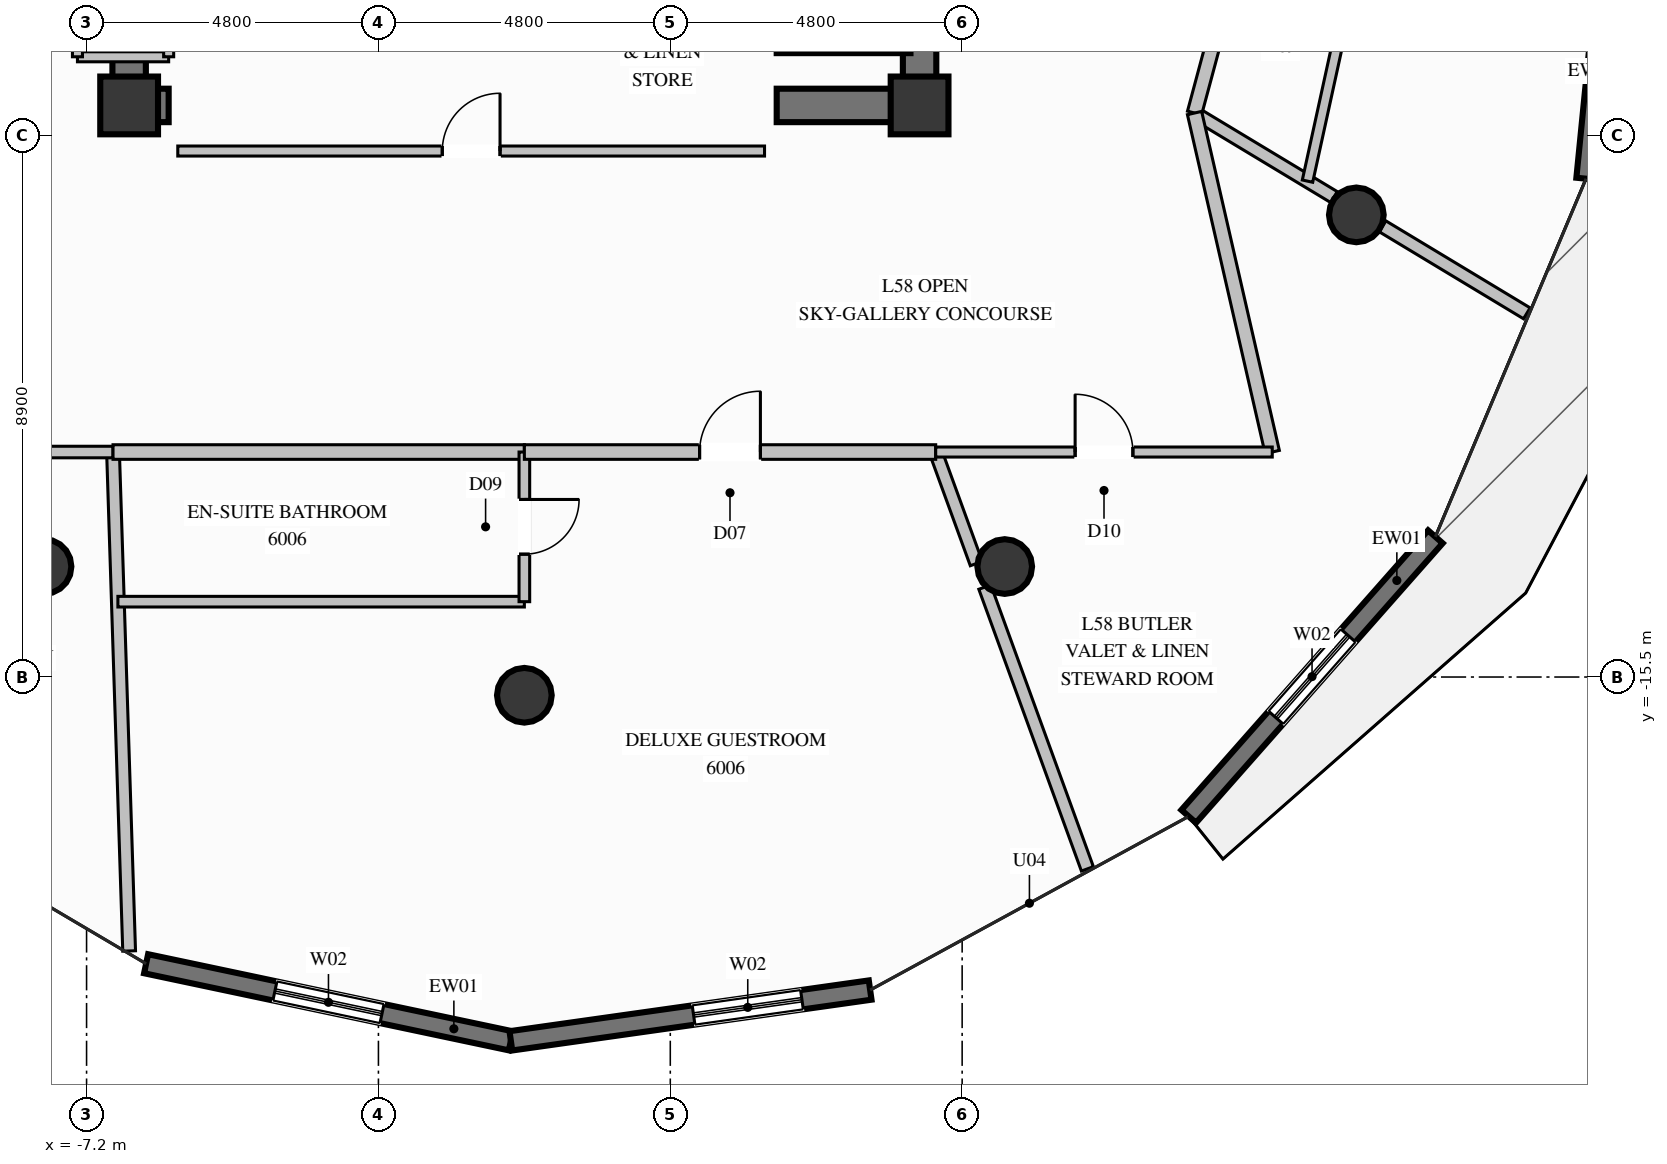
"""IFC4 building model, lengths in metres.
Left out: names, types, materials, properties, quantities, classifications, styles, units other than length and angle.
Written with IfcOpenShell. Run it as: python <this file> out.ifc"""

import sys

from ifc_helpers import new_model, si_unit, direction, frame, frame_2d, origin, origin_2d, place, context, subcontext, project, spatial, rectangle, circle, extrude, element, fill, save


model = new_model("IFC4")
c1 = context("Model", 3, precision=1e-05, world=origin(), true_north=direction((0.0, 1.0)))
c2 = subcontext(c1, "Body", "Model", "MODEL_VIEW")
j1 = project(units=[si_unit("LENGTHUNIT", "METRE"), si_unit("PLANEANGLEUNIT", "RADIAN")], contexts=[c1])
p1 = place(None, origin())
s1 = spatial("IfcSite", under=j1, at=p1, CompositionType="ELEMENT")
p2 = place(p1, origin())
s2 = spatial("IfcBuilding", under=s1, at=p2, CompositionType="ELEMENT")
p3 = place(p2, frame((0.0, 0.0, 223.6)))
s3 = spatial("IfcBuildingStorey", under=s2, at=p3, CompositionType="ELEMENT", Elevation=223.6)
for number, where, z_axis, x_axis in (
    (1, (-6.5, -6.1, 0.0), (0.0, 0.0, 1.0), (1.0, 0.0, 0.0)),
    (2, (6.5, -6.1, 0.0), (0.0, 0.0, 1.0), (1.0, 0.0, 0.0)),
):
    element("IfcColumn", number, at=place(p3, frame(where, z_axis=z_axis, x_axis=x_axis)), inside=s3, PredefinedType="COLUMN", context=c2, shape_type="SweptSolid", body=[
        extrude(rectangle(XDim=0.95, YDim=0.95, at=origin_2d()), origin(), (0.0, 0.0, 1.0), 3.6),
    ])
p4 = place(p3, frame((-6.225, -6.1, 0.0), z_axis=(0.0, 0.0, 1.0), x_axis=(1.0, 0.0, 0.0)))
e3 = element("IfcWall", 3, at=p4, inside=s3, PredefinedType="SHEAR", context=c2, shape_type="SweptSolid", body=[
    extrude(rectangle(XDim=0.375, YDim=0.55, at=frame_2d((0.188, 0.0))), origin(), (0.0, 0.0, 1.0), 3.6),
])
p5 = place(p3, frame((4.15, -6.1, 0.0), z_axis=(0.0, 0.0, 1.0), x_axis=(1.0, 0.0, 0.0)))
e4 = element("IfcWall", 4, at=p5, inside=s3, PredefinedType="SHEAR", context=c2, shape_type="SweptSolid", body=[
    extrude(rectangle(XDim=2.075, YDim=0.55, at=frame_2d((1.038, 0.0))), origin(), (0.0, 0.0, 1.0), 3.6),
])
p6 = place(p3, frame((-6.5, -6.375, 0.0), z_axis=(0.0, 0.0, 1.0), x_axis=(0.0, 1.0, 0.0)))
e5 = element("IfcWall", 5, at=p6, inside=s3, PredefinedType="SHEAR", context=c2, shape_type="SweptSolid", body=[
    extrude(rectangle(XDim=3.025, YDim=0.55, at=frame_2d((1.512, 0.0))), origin(), (0.0, 0.0, 1.0), 3.6),
])
p7 = place(p3, frame((6.5, -6.375, 0.0), z_axis=(0.0, 0.0, 1.0), x_axis=(0.0, 1.0, 0.0)))
e6 = element("IfcWall", 6, at=p7, inside=s3, PredefinedType="SHEAR", context=c2, shape_type="SweptSolid", body=[
    extrude(rectangle(XDim=4.025, YDim=0.55, at=frame_2d((2.012, 0.0))), origin(), (0.0, 0.0, 1.0), 3.6),
])
for number, where, z_axis, x_axis in (
    (7, (-7.9, -13.683, 0.0), (0.0, 0.0, 1.0), (1.0, 0.0, 0.0)),
    (8, (0.0, -15.8, 0.0), (0.0, 0.0, 1.0), (1.0, 0.0, 0.0)),
    (9, (7.9, -13.683, 0.0), (0.0, 0.0, 1.0), (1.0, 0.0, 0.0)),
    (10, (13.683, -7.9, 0.0), (0.0, 0.0, 1.0), (1.0, 0.0, 0.0)),
):
    element("IfcColumn", number, at=place(p3, frame(where, z_axis=z_axis, x_axis=x_axis)), inside=s3, PredefinedType="COLUMN", context=c2, shape_type="SweptSolid", body=[
        extrude(circle(Radius=0.45, at=origin_2d()), origin(), (0.0, 0.0, 1.0), 3.6),
    ])
p8 = place(p3, frame((14.983, -13.194, 0.0), z_axis=(0.0, 0.0, 1.0), x_axis=(-0.661613735925, -0.749844826905, 0.0)))
e11 = element("IfcWall", 11, at=p8, inside=s3, PredefinedType="SOLIDWALL", context=c2, shape_type="SweptSolid", body=[
    extrude(rectangle(XDim=6.132, YDim=0.32, at=frame_2d((3.066, 0.0))), origin(), (0.0, 0.0, 1.0), 3.36),
])
p9 = place(p8, frame((2.166, 0.0, 0.35)))
e12 = element("IfcOpeningElement", 12, at=p9, cuts=e11, PredefinedType="OPENING", context=c2, shape_type="SweptSolid", body=[
    extrude(rectangle(XDim=1.8, YDim=2.6, at=frame_2d((0.9, 1.3))), frame((0.0, 0.17, 0.0), z_axis=(0.0, -1.0, 0.0), x_axis=(1.0, 0.0, 0.0)), (0.0, 0.0, 1.0), 0.34),
])
p10 = place(p3, frame((18.117, -0.701, 0.0), z_axis=(0.0, 0.0, 1.0), x_axis=(-0.098848078175, -0.995102536144, 0.0)))
e13 = element("IfcWall", 13, at=p10, inside=s3, PredefinedType="SOLIDWALL", context=c2, shape_type="SweptSolid", body=[
    extrude(rectangle(XDim=6.636, YDim=0.32, at=frame_2d((3.318, 0.0))), origin(), (0.0, 0.0, 1.0), 3.36),
])
p11 = place(p10, frame((2.418, 0.0, 0.35)))
e14 = element("IfcOpeningElement", 14, at=p11, cuts=e13, PredefinedType="OPENING", context=c2, shape_type="SweptSolid", body=[
    extrude(rectangle(XDim=1.8, YDim=2.6, at=frame_2d((0.9, 1.3))), frame((0.0, 0.17, 0.0), z_axis=(0.0, -1.0, 0.0), x_axis=(1.0, 0.0, 0.0)), (0.0, 0.0, 1.0), 0.34),
])
p12 = place(p3, frame((-0.222, -21.483, 0.0), z_axis=(0.0, 0.0, 1.0), x_axis=(-0.978389375522, 0.206770959917, 0.0)))
e15 = element("IfcWall", 15, at=p12, inside=s3, PredefinedType="SOLIDWALL", context=c2, shape_type="SweptSolid", body=[
    extrude(rectangle(XDim=6.132, YDim=0.32, at=frame_2d((3.066, 0.0))), origin(), (0.0, 0.0, 1.0), 3.36),
])
p13 = place(p12, frame((2.166, 0.0, 0.35)))
e16 = element("IfcOpeningElement", 16, at=p13, cuts=e15, PredefinedType="OPENING", context=c2, shape_type="SweptSolid", body=[
    extrude(rectangle(XDim=1.8, YDim=2.6, at=frame_2d((0.9, 1.3))), frame((0.0, 0.17, 0.0), z_axis=(0.0, -1.0, 0.0), x_axis=(1.0, 0.0, 0.0)), (0.0, 0.0, 1.0), 0.34),
])
p14 = place(p3, frame((5.687, -20.648, 0.0), z_axis=(0.0, 0.0, 1.0), x_axis=(-0.990163538308, -0.139914857704, 0.0)))
e17 = element("IfcWall", 17, at=p14, inside=s3, PredefinedType="SOLIDWALL", context=c2, shape_type="SweptSolid", body=[
    extrude(rectangle(XDim=5.968, YDim=0.32, at=frame_2d((2.984, 0.0))), origin(), (0.0, 0.0, 1.0), 3.36),
])
p15 = place(p14, frame((1.133, 0.0, 0.35)))
e18 = element("IfcOpeningElement", 18, at=p15, cuts=e17, PredefinedType="OPENING", context=c2, shape_type="SweptSolid", body=[
    extrude(rectangle(XDim=1.8, YDim=2.6, at=frame_2d((0.9, 1.3))), frame((0.0, 0.17, 0.0), z_axis=(0.0, -1.0, 0.0), x_axis=(1.0, 0.0, 0.0)), (0.0, 0.0, 1.0), 0.34),
])
p16 = place(p3, frame((4.15, -5.1, 0.0), z_axis=(0.0, 0.0, 1.0), x_axis=(1.0, 0.0, 0.0)))
e19 = element("IfcWall", 19, at=p16, inside=s3, PredefinedType="SOLIDWALL", context=c2, shape_type="SweptSolid", body=[
    extrude(rectangle(XDim=2.2, YDim=0.28, at=frame_2d((1.1, 0.0))), origin(), (0.0, 0.0, 1.0), 3.36),
])
p17 = place(p3, frame((-7.35, -5.3, 0.0), z_axis=(0.0, 0.0, 1.0), x_axis=(1.0, 0.0, 0.0)))
e20 = element("IfcWall", 20, at=p17, inside=s3, PredefinedType="PARTITIONING", context=c2, shape_type="SweptSolid", body=[
    extrude(rectangle(XDim=1.5, YDim=0.165, at=frame_2d((0.75, 0.0))), origin(), (0.0, 0.0, 1.0), 2.445),
])
p18 = place(p3, frame((-5.85, -5.3, 0.0), z_axis=(0.0, 0.0, 1.0), x_axis=(0.0, 1.0, 0.0)))
e21 = element("IfcWall", 21, at=p18, inside=s3, PredefinedType="PARTITIONING", context=c2, shape_type="SweptSolid", body=[
    extrude(rectangle(XDim=2.5, YDim=0.165, at=frame_2d((1.25, 0.0))), origin(), (0.0, 0.0, 1.0), 2.445),
])
p19 = place(p3, frame((-7.35, -2.8, 0.0), z_axis=(0.0, 0.0, 1.0), x_axis=(0.0, -1.0, 0.0)))
e22 = element("IfcWall", 22, at=p19, inside=s3, PredefinedType="PARTITIONING", context=c2, shape_type="SweptSolid", body=[
    extrude(rectangle(XDim=2.5, YDim=0.165, at=frame_2d((1.25, 0.0))), origin(), (0.0, 0.0, 1.0), 3.36),
])
p20 = place(p19, frame((0.775, 0.0, 0.0)))
e23 = element("IfcOpeningElement", 23, at=p20, cuts=e22, PredefinedType="OPENING", context=c2, shape_type="SweptSolid", body=[
    extrude(rectangle(XDim=0.95, YDim=2.1, at=frame_2d((0.475, 1.05))), frame((0.0, 0.093, 0.0), z_axis=(0.0, -1.0, 0.0), x_axis=(1.0, 0.0, 0.0)), (0.0, 0.0, 1.0), 0.185),
])
p21 = place(p3, frame((-5.7, -6.85, 0.0), z_axis=(0.0, 0.0, 1.0), x_axis=(1.0, 0.0, 0.0)))
e24 = element("IfcWall", 24, at=p21, inside=s3, PredefinedType="PARTITIONING", context=c2, shape_type="SweptSolid", body=[
    extrude(rectangle(XDim=9.65, YDim=0.165, at=frame_2d((4.825, 0.0))), origin(), (0.0, 0.0, 1.0), 2.445),
])
p22 = place(p21, frame((4.35, 0.0, 0.0)))
e25 = element("IfcOpeningElement", 25, at=p22, cuts=e24, PredefinedType="OPENING", context=c2, shape_type="SweptSolid", body=[
    extrude(rectangle(XDim=0.95, YDim=2.1, at=frame_2d((0.475, 1.05))), frame((0.0, 0.093, 0.0), z_axis=(0.0, -1.0, 0.0), x_axis=(1.0, 0.0, 0.0)), (0.0, 0.0, 1.0), 0.185),
])
p23 = place(p3, frame((11.022, -6.225, 0.0), z_axis=(0.0, 0.0, 1.0), x_axis=(0.856493544161, -0.516157736366, 0.0)))
e26 = element("IfcWall", 26, at=p23, inside=s3, PredefinedType="PARTITIONING", context=c2, shape_type="SweptSolid", body=[
    extrude(rectangle(XDim=2.677, YDim=0.21, at=frame_2d((1.339, 0.0))), origin(), (0.0, 0.0, 1.0), 2.801),
])
p24 = place(p3, frame((14.114, -8.088, 0.0), z_axis=(0.0, 0.0, 1.0), x_axis=(0.856324704074, -0.516437799926, 0.0)))
e27 = element("IfcWall", 27, at=p24, inside=s3, PredefinedType="PARTITIONING", context=c2, shape_type="SweptSolid", body=[
    extrude(rectangle(XDim=2.771, YDim=0.21, at=frame_2d((1.386, 0.0))), origin(), (0.0, 0.0, 1.0), 3.36),
])
p25 = place(p3, frame((11.022, -6.225, 0.0), z_axis=(0.0, 0.0, 1.0), x_axis=(0.259760468719, 0.965673080753, 0.0)))
e28 = element("IfcWall", 28, at=p25, inside=s3, PredefinedType="PARTITIONING", context=c2, shape_type="SweptSolid", body=[
    extrude(rectangle(XDim=2.795, YDim=0.24, at=frame_2d((1.397, 0.0))), origin(), (0.0, 0.0, 1.0), 3.36),
])
p26 = place(p3, frame((12.88, -7.345, 0.0), z_axis=(0.0, 0.0, 1.0), x_axis=(0.214043321531, 0.976824168675, 0.0)))
e29 = element("IfcWall", 29, at=p26, inside=s3, PredefinedType="PLUMBINGWALL", context=c2, shape_type="SweptSolid", body=[
    extrude(rectangle(XDim=3.215, YDim=0.175, at=frame_2d((1.608, 0.0))), origin(), (0.0, 0.0, 1.0), 3.36),
])
p27 = place(p3, frame((-6.765, -11.8, 0.0), z_axis=(0.0, 0.0, 1.0), x_axis=(0.032268128202, -0.99947924836, 0.0)))
e30 = element("IfcWall", 30, at=p27, inside=s3, PredefinedType="PARTITIONING", context=c2, shape_type="SweptSolid", body=[
    extrude(rectangle(XDim=8.209, YDim=0.21, at=frame_2d((4.104, 0.0))), origin(), (0.0, 0.0, 1.0), 3.36),
])
p28 = place(p3, frame((-12.3, -11.8, 0.0), z_axis=(0.0, 0.0, 1.0), x_axis=(1.0, 0.0, 0.0)))
e31 = element("IfcWall", 31, at=p28, inside=s3, PredefinedType="PARTITIONING", context=c2, shape_type="SweptSolid", body=[
    extrude(rectangle(XDim=5.535, YDim=0.19, at=frame_2d((2.768, 0.0))), origin(), (0.0, 0.0, 1.0), 3.36),
])
p29 = place(p28, frame((2.293, 0.0, 0.0)))
e32 = element("IfcOpeningElement", 32, at=p29, cuts=e31, PredefinedType="OPENING", context=c2, shape_type="SweptSolid", body=[
    extrude(rectangle(XDim=0.95, YDim=2.1, at=frame_2d((0.475, 1.05))), frame((0.0, 0.105, 0.0), z_axis=(0.0, -1.0, 0.0), x_axis=(1.0, 0.0, 0.0)), (0.0, 0.0, 1.0), 0.21),
])
p30 = place(p3, frame((-6.765, -11.8, 0.0), z_axis=(0.0, 0.0, 1.0), x_axis=(1.0, 0.0, 0.0)))
e33 = element("IfcWall", 33, at=p30, inside=s3, PredefinedType="PARTITIONING", context=c2, shape_type="SweptSolid", body=[
    extrude(rectangle(XDim=6.765, YDim=0.24, at=frame_2d((3.382, 0.0))), origin(), (0.0, 0.0, 1.0), 3.36),
])
p31 = place(p3, frame((-6.685, -14.261, 0.0), z_axis=(0.0, 0.0, 1.0), x_axis=(1.0, 0.0, 0.0)))
e34 = element("IfcWall", 34, at=p31, inside=s3, PredefinedType="PLUMBINGWALL", context=c2, shape_type="SweptSolid", body=[
    extrude(rectangle(XDim=6.685, YDim=0.175, at=frame_2d((3.343, 0.0))), origin(), (0.0, 0.0, 1.0), 2.929),
])
p32 = place(p3, frame((0.0, -11.8, 0.0), z_axis=(0.0, 0.0, 1.0), x_axis=(0.0, -1.0, 0.0)))
e35 = element("IfcWall", 35, at=p32, inside=s3, PredefinedType="PLUMBINGWALL", context=c2, shape_type="SweptSolid", body=[
    extrude(rectangle(XDim=2.461, YDim=0.175, at=frame_2d((1.23, 0.0))), origin(), (0.0, 0.0, 1.0), 3.36),
])
p33 = place(p32, frame((0.78, 0.0, 0.0)))
e36 = element("IfcOpeningElement", 36, at=p33, cuts=e35, PredefinedType="OPENING", context=c2, shape_type="SweptSolid", body=[
    extrude(rectangle(XDim=0.9, YDim=2.1, at=frame_2d((0.45, 1.05))), frame((0.0, 0.098, 0.0), z_axis=(0.0, -1.0, 0.0), x_axis=(1.0, 0.0, 0.0)), (0.0, 0.0, 1.0), 0.195),
])
p34 = place(p3, frame((6.765, -11.8, 0.0), z_axis=(0.0, 0.0, 1.0), x_axis=(0.342335512807, -0.939577775743, 0.0)))
e37 = element("IfcWall", 37, at=p34, inside=s3, PredefinedType="PARTITIONING", context=c2, shape_type="SweptSolid", body=[
    extrude(rectangle(XDim=1.952, YDim=0.21, at=frame_2d((0.976, 0.0))), origin(), (0.0, 0.0, 1.0), 2.801),
])
p35 = place(p3, frame((7.573, -14.021, 0.0), z_axis=(0.0, 0.0, 1.0), x_axis=(0.342084883254, -0.939669054854, 0.0)))
e38 = element("IfcWall", 38, at=p35, inside=s3, PredefinedType="PARTITIONING", context=c2, shape_type="SweptSolid", body=[
    extrude(rectangle(XDim=4.932, YDim=0.21, at=frame_2d((2.466, 0.0))), origin(), (0.0, 0.0, 1.0), 3.36),
])
p36 = place(p3, frame((0.0, -11.8, 0.0), z_axis=(0.0, 0.0, 1.0), x_axis=(1.0, 0.0, 0.0)))
e39 = element("IfcWall", 39, at=p36, inside=s3, PredefinedType="PARTITIONING", context=c2, shape_type="SweptSolid", body=[
    extrude(rectangle(XDim=6.765, YDim=0.24, at=frame_2d((3.382, 0.0))), origin(), (0.0, 0.0, 1.0), 3.36),
])
p37 = place(p36, frame((2.882, 0.0, 0.0)))
e40 = element("IfcOpeningElement", 40, at=p37, cuts=e39, PredefinedType="OPENING", context=c2, shape_type="SweptSolid", body=[
    extrude(rectangle(XDim=1.0, YDim=2.2, at=frame_2d((0.5, 1.1))), frame((0.0, 0.13, 0.0), z_axis=(0.0, -1.0, 0.0), x_axis=(1.0, 0.0, 0.0)), (0.0, 0.0, 1.0), 0.26),
])
p38 = place(p3, frame((12.3, -11.8, 0.0), z_axis=(0.0, 0.0, 1.0), x_axis=(-0.223456421134, 0.974713921032, 0.0)))
e41 = element("IfcWall", 41, at=p38, inside=s3, PredefinedType="PARTITIONING", context=c2, shape_type="SweptSolid", body=[
    extrude(rectangle(XDim=5.719, YDim=0.24, at=frame_2d((2.86, 0.0))), origin(), (0.0, 0.0, 1.0), 3.36),
])
p39 = place(p3, frame((6.765, -11.8, 0.0), z_axis=(0.0, 0.0, 1.0), x_axis=(1.0, 0.0, 0.0)))
e42 = element("IfcWall", 42, at=p39, inside=s3, PredefinedType="PARTITIONING", context=c2, shape_type="SweptSolid", body=[
    extrude(rectangle(XDim=5.535, YDim=0.165, at=frame_2d((2.768, 0.0))), origin(), (0.0, 0.0, 1.0), 3.36),
])
p40 = place(p39, frame((2.293, 0.0, 0.0)))
e43 = element("IfcOpeningElement", 43, at=p40, cuts=e42, PredefinedType="OPENING", context=c2, shape_type="SweptSolid", body=[
    extrude(rectangle(XDim=0.95, YDim=2.1, at=frame_2d((0.475, 1.05))), frame((0.0, 0.093, 0.0), z_axis=(0.0, -1.0, 0.0), x_axis=(1.0, 0.0, 0.0)), (0.0, 0.0, 1.0), 0.185),
])
p41 = place(p9, origin())
e44 = element("IfcWindow", 44, at=p41, inside=s3, PartitioningType="SINGLE_PANEL", PredefinedType="WINDOW", context=c2, shape_type="SweptSolid", body=[
    extrude(rectangle(XDim=1.8, YDim=2.6, at=frame_2d((0.9, 1.3))), frame((0.0, 0.03, 0.0), z_axis=(0.0, -1.0, 0.0), x_axis=(1.0, 0.0, 0.0)), (0.0, 0.0, 1.0), 0.06),
])
fill(e12, e44)
p42 = place(p13, origin())
e45 = element("IfcWindow", 45, at=p42, inside=s3, PartitioningType="SINGLE_PANEL", PredefinedType="WINDOW", context=c2, shape_type="SweptSolid", body=[
    extrude(rectangle(XDim=1.8, YDim=2.6, at=frame_2d((0.9, 1.3))), frame((0.0, 0.03, 0.0), z_axis=(0.0, -1.0, 0.0), x_axis=(1.0, 0.0, 0.0)), (0.0, 0.0, 1.0), 0.06),
])
fill(e16, e45)
p43 = place(p15, origin())
e46 = element("IfcWindow", 46, at=p43, inside=s3, PartitioningType="SINGLE_PANEL", PredefinedType="WINDOW", context=c2, shape_type="SweptSolid", body=[
    extrude(rectangle(XDim=1.8, YDim=2.6, at=frame_2d((0.9, 1.3))), frame((0.0, 0.03, 0.0), z_axis=(0.0, -1.0, 0.0), x_axis=(1.0, 0.0, 0.0)), (0.0, 0.0, 1.0), 0.06),
])
fill(e18, e46)
p44 = place(p22, origin())
e47 = element("IfcDoor", 47, at=p44, inside=s3, OperationType="SINGLE_SWING_RIGHT", PredefinedType="DOOR", context=c2, shape_type="SweptSolid", body=[
    extrude(rectangle(XDim=0.95, YDim=2.1, at=frame_2d((0.475, 1.05))), frame((0.0, 0.025, 0.0), z_axis=(0.0, -1.0, 0.0), x_axis=(1.0, 0.0, 0.0)), (0.0, 0.0, 1.0), 0.05),
])
fill(e25, e47)
p45 = place(p33, origin())
e48 = element("IfcDoor", 48, at=p45, inside=s3, OperationType="SINGLE_SWING_LEFT", PredefinedType="DOOR", context=c2, shape_type="SweptSolid", body=[
    extrude(rectangle(XDim=0.9, YDim=2.1, at=frame_2d((0.45, 1.05))), frame((0.0, 0.025, 0.0), z_axis=(0.0, -1.0, 0.0), x_axis=(1.0, 0.0, 0.0)), (0.0, 0.0, 1.0), 0.05),
])
fill(e36, e48)
p46 = place(p37, origin())
e49 = element("IfcDoor", 49, at=p46, inside=s3, OperationType="SINGLE_SWING_RIGHT", PredefinedType="DOOR", context=c2, shape_type="SweptSolid", body=[
    extrude(rectangle(XDim=1.0, YDim=2.2, at=frame_2d((0.5, 1.1))), frame((0.0, 0.025, 0.0), z_axis=(0.0, -1.0, 0.0), x_axis=(1.0, 0.0, 0.0)), (0.0, 0.0, 1.0), 0.05),
])
fill(e40, e49)
p47 = place(p40, origin())
e50 = element("IfcDoor", 50, at=p47, inside=s3, OperationType="SINGLE_SWING_LEFT", PredefinedType="DOOR", context=c2, shape_type="SweptSolid", body=[
    extrude(rectangle(XDim=0.95, YDim=2.1, at=frame_2d((0.475, 1.05))), frame((0.0, 0.025, 0.0), z_axis=(0.0, -1.0, 0.0), x_axis=(1.0, 0.0, 0.0)), (0.0, 0.0, 1.0), 0.05),
])
fill(e43, e50)
save(model, sys.argv[1])
